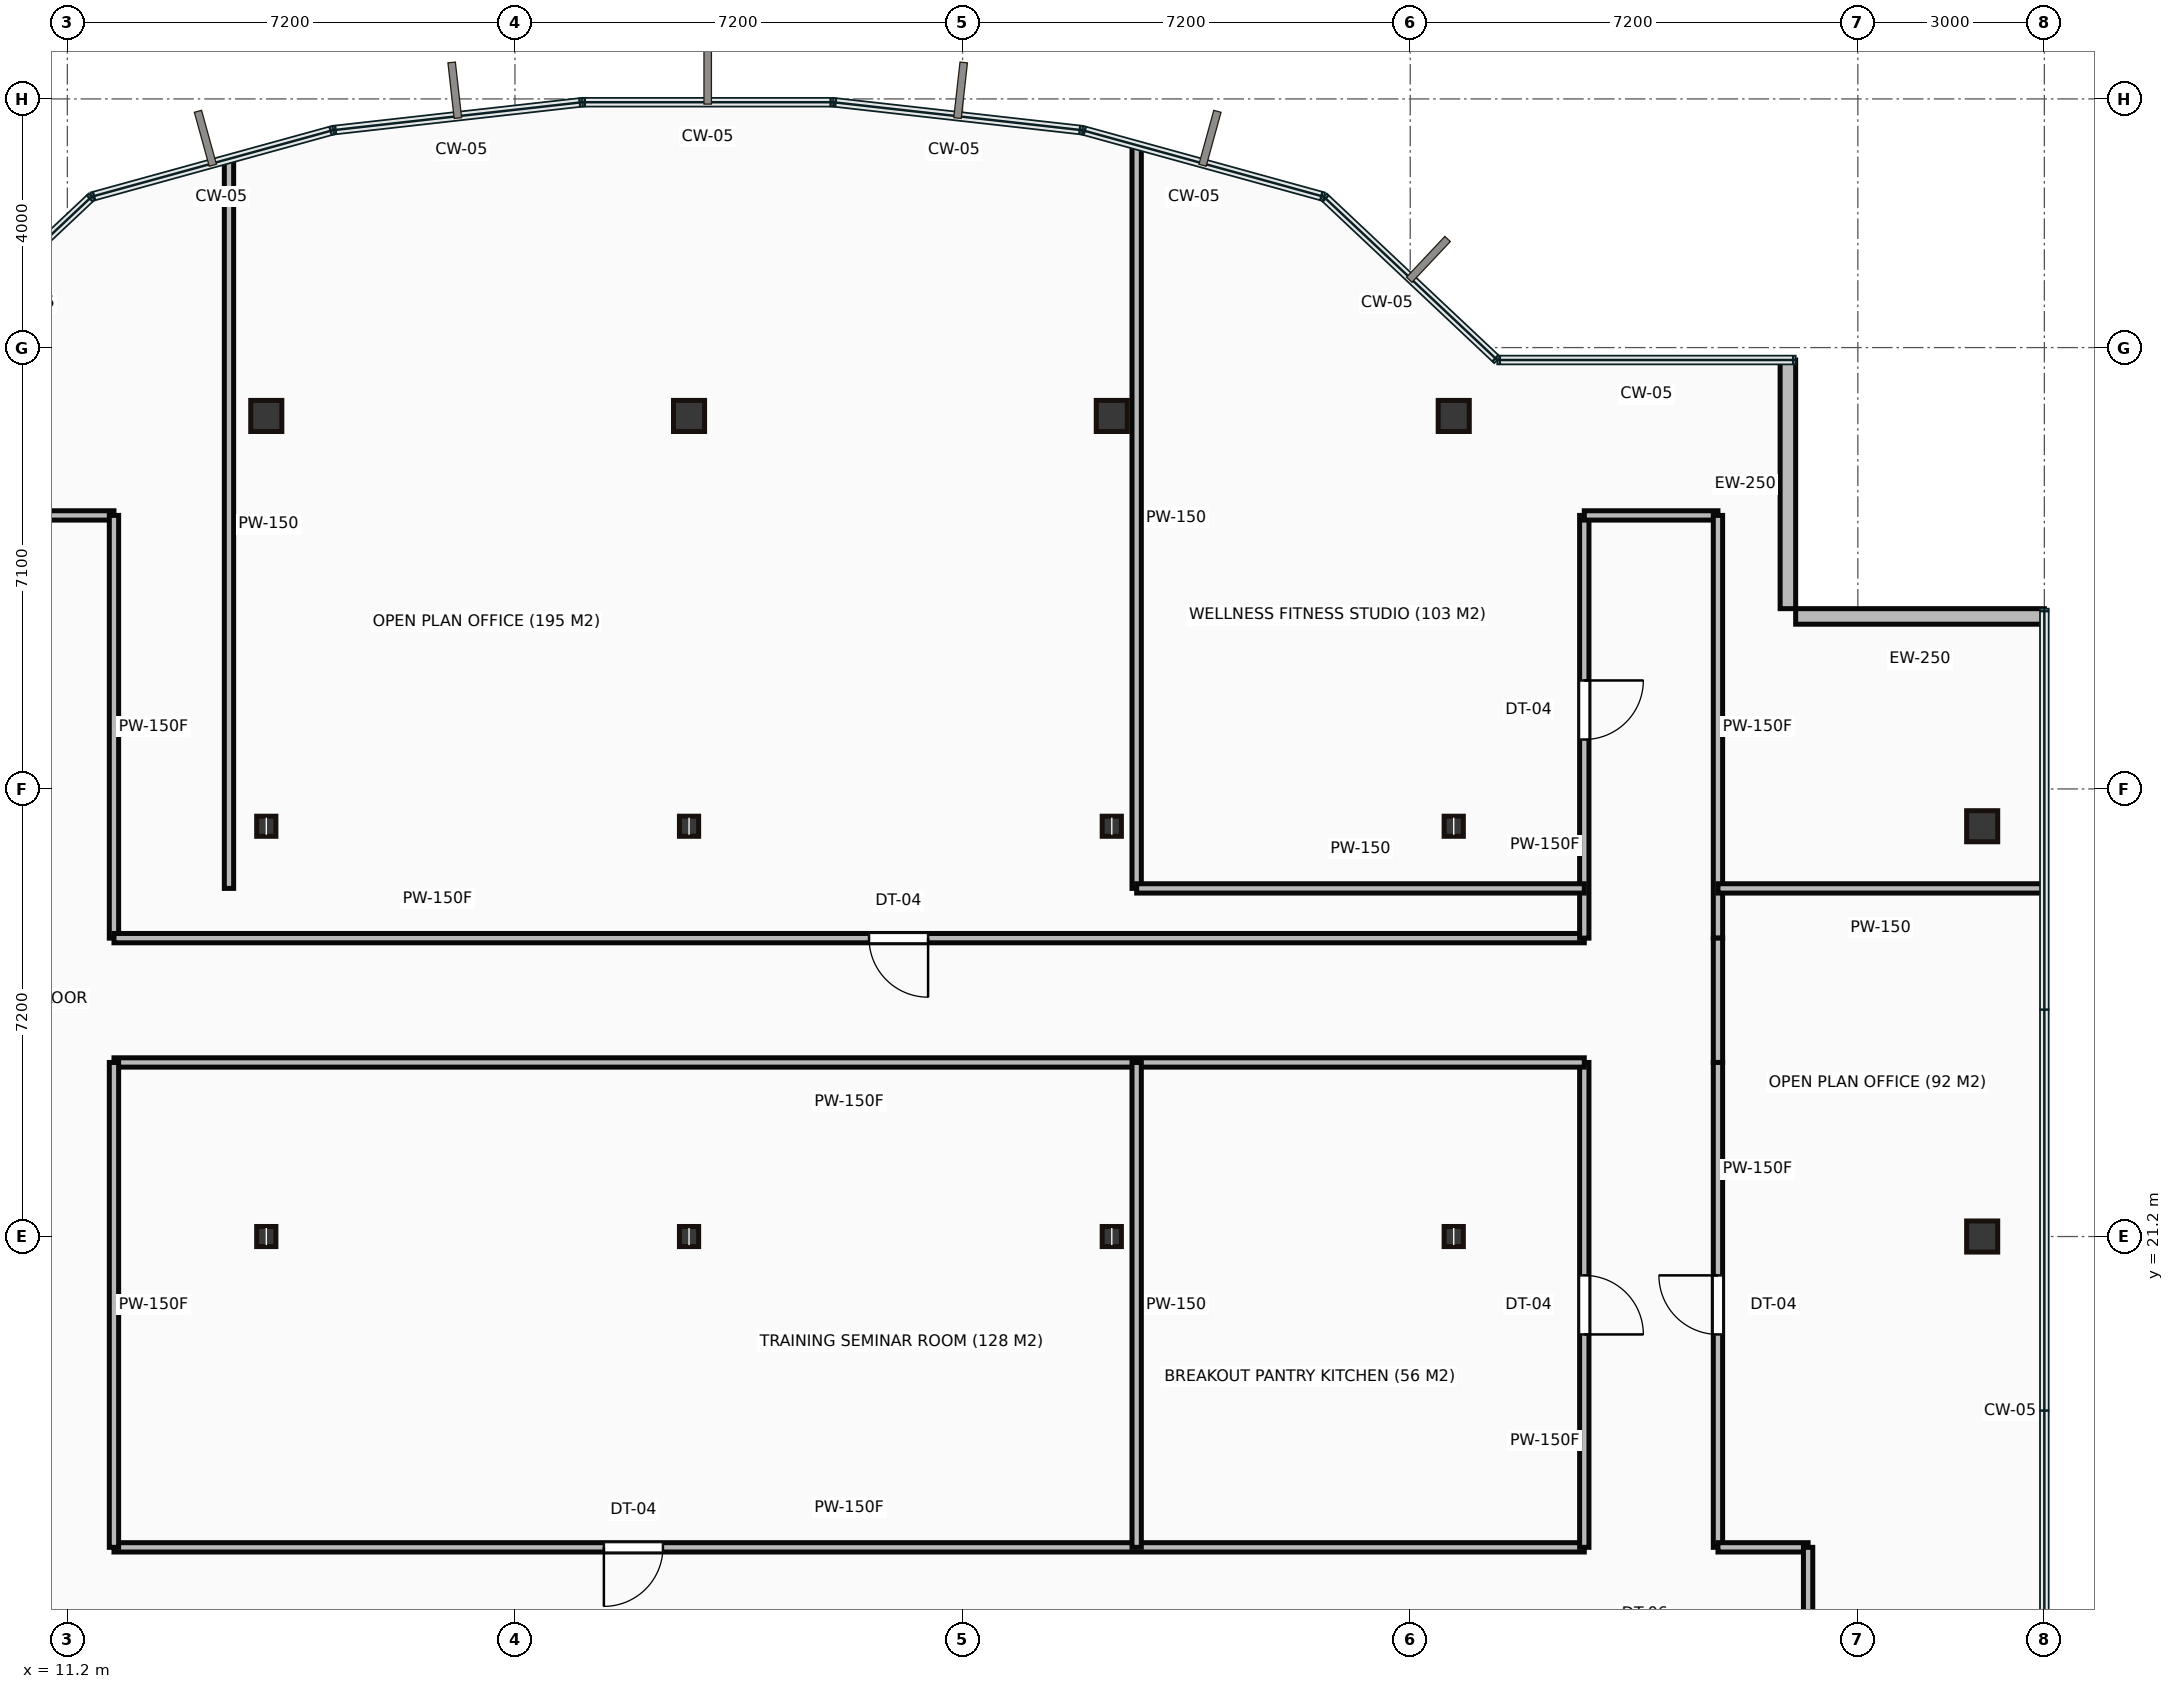
"""IFC4 building model, lengths in metres.
Left out: names, types, materials, properties, quantities, classifications, styles, units other than length and angle.
Written with IfcOpenShell. Run it as: python <this file> out.ifc"""

import sys

from ifc_helpers import new_model, si_unit, direction, frame, frame_2d, origin, origin_2d, place, context, subcontext, project, spatial, rectangle, hollow_rectangle, i_section, extrude, source, transform, mapped, element, fill, save


model = new_model("IFC4")
c1 = context("Model", 3, precision=1e-05, world=origin(), true_north=direction((0.0, 1.0)))
c2 = subcontext(c1, "Body", "Model", "MODEL_VIEW")
j1 = project(units=[si_unit("LENGTHUNIT", "METRE"), si_unit("PLANEANGLEUNIT", "RADIAN")], contexts=[c1])
p1 = place(None, origin())
s1 = spatial("IfcSite", under=j1, at=p1, CompositionType="ELEMENT")
p2 = place(p1, origin())
s2 = spatial("IfcBuilding", under=s1, at=p2, CompositionType="ELEMENT")
p3 = place(p2, frame((0.0, 0.0, 244.2)))
s3 = spatial("IfcBuildingStorey", under=s2, at=p3, CompositionType="ELEMENT", Elevation=244.2)
m1 = source(origin(), c2, "Body", "SweptSolid", [
    extrude(i_section(OverallWidth=0.309, OverallDepth=0.323, WebThickness=0.014, FlangeThickness=0.023, at=origin_2d()), origin(), (0.0, 0.0, 1.0), 3.65),
])
for number, where, z_axis, x_axis in (
    (1, (14.4, 21.2, 0.0), (0.0, 0.0, 1.0), (1.0, 0.0, 0.0)),
    (2, (14.4, 27.8, 0.0), (0.0, 0.0, 1.0), (1.0, 0.0, 0.0)),
):
    element("IfcColumn", number, at=place(p3, frame(where, z_axis=z_axis, x_axis=x_axis)), inside=s3, PredefinedType="COLUMN", context=c2, shape_type="MappedRepresentation", body=[
        mapped(m1, transform((0.0, 0.0, 0.0))),
    ])
m2 = source(origin(), c2, "Body", "SweptSolid", [
    extrude(hollow_rectangle(XDim=0.5, YDim=0.5, WallThickness=0.022, at=origin_2d()), origin(), (0.0, 0.0, 1.0), 3.65),
])
p4 = place(p3, frame((14.4, 34.4, 0.0), z_axis=(0.0, 0.0, 1.0), x_axis=(1.0, 0.0, 0.0)))
e3 = element("IfcColumn", 3, at=p4, inside=s3, PredefinedType="COLUMN", context=c2, shape_type="MappedRepresentation", body=[
    mapped(m2, transform((0.0, 0.0, 0.0))),
])
for number, where, z_axis, x_axis in (
    (4, (21.2, 21.2, 0.0), (0.0, 0.0, 1.0), (1.0, 0.0, 0.0)),
    (5, (21.2, 27.8, 0.0), (0.0, 0.0, 1.0), (1.0, 0.0, 0.0)),
):
    element("IfcColumn", number, at=place(p3, frame(where, z_axis=z_axis, x_axis=x_axis)), inside=s3, PredefinedType="COLUMN", context=c2, shape_type="MappedRepresentation", body=[
        mapped(m1, transform((0.0, 0.0, 0.0))),
    ])
p5 = place(p3, frame((21.2, 34.4, 0.0), z_axis=(0.0, 0.0, 1.0), x_axis=(1.0, 0.0, 0.0)))
e6 = element("IfcColumn", 6, at=p5, inside=s3, PredefinedType="COLUMN", context=c2, shape_type="MappedRepresentation", body=[
    mapped(m2, transform((0.0, 0.0, 0.0))),
])
for number, where, z_axis, x_axis in (
    (7, (28.0, 21.2, 0.0), (0.0, 0.0, 1.0), (1.0, 0.0, 0.0)),
    (8, (28.0, 27.8, 0.0), (0.0, 0.0, 1.0), (1.0, 0.0, 0.0)),
):
    element("IfcColumn", number, at=place(p3, frame(where, z_axis=z_axis, x_axis=x_axis)), inside=s3, PredefinedType="COLUMN", context=c2, shape_type="MappedRepresentation", body=[
        mapped(m1, transform((0.0, 0.0, 0.0))),
    ])
p6 = place(p3, frame((28.0, 34.4, 0.0), z_axis=(0.0, 0.0, 1.0), x_axis=(1.0, 0.0, 0.0)))
e9 = element("IfcColumn", 9, at=p6, inside=s3, PredefinedType="COLUMN", context=c2, shape_type="MappedRepresentation", body=[
    mapped(m2, transform((0.0, 0.0, 0.0))),
])
for number, where, z_axis, x_axis in (
    (10, (33.5, 21.2, 0.0), (0.0, 0.0, 1.0), (1.0, 0.0, 0.0)),
    (11, (33.5, 27.8, 0.0), (0.0, 0.0, 1.0), (1.0, 0.0, 0.0)),
):
    element("IfcColumn", number, at=place(p3, frame(where, z_axis=z_axis, x_axis=x_axis)), inside=s3, PredefinedType="COLUMN", context=c2, shape_type="MappedRepresentation", body=[
        mapped(m1, transform((0.0, 0.0, 0.0))),
    ])
for number, where, z_axis, x_axis in (
    (12, (33.5, 34.4, 0.0), (0.0, 0.0, 1.0), (1.0, 0.0, 0.0)),
    (13, (42.0, 21.2, 0.0), (0.0, 0.0, 1.0), (1.0, 0.0, 0.0)),
    (14, (42.0, 27.8, 0.0), (0.0, 0.0, 1.0), (1.0, 0.0, 0.0)),
):
    element("IfcColumn", number, at=place(p3, frame(where, z_axis=z_axis, x_axis=x_axis)), inside=s3, PredefinedType="COLUMN", context=c2, shape_type="MappedRepresentation", body=[
        mapped(m2, transform((0.0, 0.0, 0.0))),
    ])
m3 = source(origin(), c2, "Body", "SweptSolid", [
    extrude(rectangle(XDim=4.0, YDim=0.25, at=frame_2d((2.0, 0.0))), origin(), (0.0, 0.0, 1.0), 3.4),
])
for number, where, z_axis, x_axis in (
    (15, (43.0, 31.175, 0.0), (0.0, 0.0, 1.0), (-1.0, 0.0, 0.0)),
    (16, (38.875, 31.3, 0.0), (0.0, 0.0, 1.0), (0.0, 1.0, 0.0)),
):
    element("IfcWall", number, at=place(p3, frame(where, z_axis=z_axis, x_axis=x_axis)), inside=s3, PredefinedType="STANDARD", context=c2, shape_type="MappedRepresentation", body=[
        mapped(m3, transform((0.0, 0.0, 0.0))),
    ])
m4 = source(origin(), c2, "Body", "SweptSolid", [
    extrude(rectangle(XDim=2.15, YDim=0.15, at=frame_2d((1.075, 0.0))), origin(), (0.0, 0.0, 1.0), 3.4),
])
p7 = place(p3, frame((9.8, 32.8, 0.0), z_axis=(0.0, 0.0, 1.0), x_axis=(1.0, 0.0, 0.0)))
e17 = element("IfcWall", 17, at=p7, inside=s3, PredefinedType="PARTITIONING", context=c2, shape_type="MappedRepresentation", body=[
    mapped(m4, transform((0.0, 0.0, 0.0))),
])
m5 = source(origin(), c2, "Body", "SweptSolid", [
    extrude(rectangle(XDim=6.8, YDim=0.15, at=frame_2d((3.4, 0.0))), origin(), (0.0, 0.0, 1.0), 3.4),
])
p8 = place(p3, frame((11.95, 32.8, 0.0), z_axis=(0.0, 0.0, 1.0), x_axis=(0.0, -1.0, 0.0)))
e18 = element("IfcWall", 18, at=p8, inside=s3, PredefinedType="PARTITIONING", context=c2, shape_type="MappedRepresentation", body=[
    mapped(m5, transform((0.0, 0.0, 0.0))),
])
m6 = source(origin(), c2, "Body", "SweptSolid", [
    extrude(rectangle(XDim=23.65, YDim=0.15, at=frame_2d((11.825, 0.0))), origin(), (0.0, 0.0, 1.0), 3.4),
])
p9 = place(p3, frame((11.95, 26.0, 0.0), z_axis=(0.0, 0.0, 1.0), x_axis=(1.0, 0.0, 0.0)))
e19 = element("IfcWall", 19, at=p9, inside=s3, PredefinedType="PARTITIONING", context=c2, shape_type="MappedRepresentation", body=[
    mapped(m6, transform((0.0, 0.0, 0.0))),
])
p10 = place(p9, frame((12.145, 0.0, 0.0)))
e20 = element("IfcOpeningElement", 20, at=p10, cuts=e19, PredefinedType="OPENING", context=c2, shape_type="SweptSolid", body=[
    extrude(rectangle(XDim=0.95, YDim=2.15, at=frame_2d((0.475, 1.075))), frame((0.0, 0.085, 0.0), z_axis=(0.0, -1.0, 0.0), x_axis=(1.0, 0.0, 0.0)), (0.0, 0.0, 1.0), 0.17),
])
p11 = place(p3, frame((35.6, 26.0, 0.0), z_axis=(0.0, 0.0, 1.0), x_axis=(0.0, 1.0, 0.0)))
e21 = element("IfcWall", 21, at=p11, inside=s3, PredefinedType="PARTITIONING", context=c2, shape_type="MappedRepresentation", body=[
    mapped(m5, transform((0.0, 0.0, 0.0))),
])
p12 = place(p11, frame((3.195, 0.0, 0.0)))
e22 = element("IfcOpeningElement", 22, at=p12, cuts=e21, PredefinedType="OPENING", context=c2, shape_type="SweptSolid", body=[
    extrude(rectangle(XDim=0.95, YDim=2.15, at=frame_2d((0.475, 1.075))), frame((0.0, 0.085, 0.0), z_axis=(0.0, -1.0, 0.0), x_axis=(1.0, 0.0, 0.0)), (0.0, 0.0, 1.0), 0.17),
])
p13 = place(p3, frame((35.6, 32.8, 0.0), z_axis=(0.0, 0.0, 1.0), x_axis=(1.0, 0.0, 0.0)))
e23 = element("IfcWall", 23, at=p13, inside=s3, PredefinedType="PARTITIONING", context=c2, shape_type="MappedRepresentation", body=[
    mapped(m4, transform((0.0, 0.0, 0.0))),
])
p14 = place(p3, frame((37.75, 32.8, 0.0), z_axis=(0.0, 0.0, 1.0), x_axis=(0.0, -1.0, 0.0)))
e24 = element("IfcWall", 24, at=p14, inside=s3, PredefinedType="PARTITIONING", context=c2, shape_type="MappedRepresentation", body=[
    mapped(m5, transform((0.0, 0.0, 0.0))),
])
m7 = source(origin(), c2, "Body", "SweptSolid", [
    extrude(rectangle(XDim=2.0, YDim=0.15, at=frame_2d((1.0, 0.0))), origin(), (0.0, 0.0, 1.0), 3.4),
])
p15 = place(p3, frame((37.75, 26.0, 0.0), z_axis=(0.0, 0.0, 1.0), x_axis=(0.0, -1.0, 0.0)))
e25 = element("IfcWall", 25, at=p15, inside=s3, PredefinedType="PARTITIONING", context=c2, shape_type="MappedRepresentation", body=[
    mapped(m7, transform((0.0, 0.0, 0.0))),
])
m8 = source(origin(), c2, "Body", "SweptSolid", [
    extrude(rectangle(XDim=7.8, YDim=0.15, at=frame_2d((3.9, 0.0))), origin(), (0.0, 0.0, 1.0), 3.4),
])
p16 = place(p3, frame((37.75, 24.0, 0.0), z_axis=(0.0, 0.0, 1.0), x_axis=(0.0, -1.0, 0.0)))
e26 = element("IfcWall", 26, at=p16, inside=s3, PredefinedType="PARTITIONING", context=c2, shape_type="MappedRepresentation", body=[
    mapped(m8, transform((0.0, 0.0, 0.0))),
])
p17 = place(p16, frame((3.425, 0.0, 0.0)))
e27 = element("IfcOpeningElement", 27, at=p17, cuts=e26, PredefinedType="OPENING", context=c2, shape_type="SweptSolid", body=[
    extrude(rectangle(XDim=0.95, YDim=2.15, at=frame_2d((0.475, 1.075))), frame((0.0, 0.085, 0.0), z_axis=(0.0, -1.0, 0.0), x_axis=(1.0, 0.0, 0.0)), (0.0, 0.0, 1.0), 0.17),
])
m9 = source(origin(), c2, "Body", "SweptSolid", [
    extrude(rectangle(XDim=1.45, YDim=0.15, at=frame_2d((0.725, 0.0))), origin(), (0.0, 0.0, 1.0), 3.4),
])
p18 = place(p3, frame((37.75, 16.2, 0.0), z_axis=(0.0, 0.0, 1.0), x_axis=(1.0, 0.0, 0.0)))
e28 = element("IfcWall", 28, at=p18, inside=s3, PredefinedType="PARTITIONING", context=c2, shape_type="MappedRepresentation", body=[
    mapped(m9, transform((0.0, 0.0, 0.0))),
])
m10 = source(origin(), c2, "Body", "SweptSolid", [
    extrude(rectangle(XDim=2.2, YDim=0.15, at=frame_2d((1.1, 0.0))), origin(), (0.0, 0.0, 1.0), 3.4),
])
p19 = place(p3, frame((39.2, 16.2, 0.0), z_axis=(0.0, 0.0, 1.0), x_axis=(0.0, -1.0, 0.0)))
e29 = element("IfcWall", 29, at=p19, inside=s3, PredefinedType="PARTITIONING", context=c2, shape_type="MappedRepresentation", body=[
    mapped(m10, transform((0.0, 0.0, 0.0))),
])
p20 = place(p3, frame((11.95, 16.2, 0.0), z_axis=(0.0, 0.0, 1.0), x_axis=(1.0, 0.0, 0.0)))
e30 = element("IfcWall", 30, at=p20, inside=s3, PredefinedType="PARTITIONING", context=c2, shape_type="MappedRepresentation", body=[
    mapped(m6, transform((0.0, 0.0, 0.0))),
])
p21 = place(p20, frame((7.88, 0.0, 0.0)))
e31 = element("IfcOpeningElement", 31, at=p21, cuts=e30, PredefinedType="OPENING", context=c2, shape_type="SweptSolid", body=[
    extrude(rectangle(XDim=0.95, YDim=2.15, at=frame_2d((0.475, 1.075))), frame((0.0, 0.085, 0.0), z_axis=(0.0, -1.0, 0.0), x_axis=(1.0, 0.0, 0.0)), (0.0, 0.0, 1.0), 0.17),
])
p22 = place(p3, frame((35.6, 16.2, 0.0), z_axis=(0.0, 0.0, 1.0), x_axis=(0.0, 1.0, 0.0)))
e32 = element("IfcWall", 32, at=p22, inside=s3, PredefinedType="PARTITIONING", context=c2, shape_type="MappedRepresentation", body=[
    mapped(m8, transform((0.0, 0.0, 0.0))),
])
p23 = place(p22, frame((3.425, 0.0, 0.0)))
e33 = element("IfcOpeningElement", 33, at=p23, cuts=e32, PredefinedType="OPENING", context=c2, shape_type="SweptSolid", body=[
    extrude(rectangle(XDim=0.95, YDim=2.15, at=frame_2d((0.475, 1.075))), frame((0.0, 0.085, 0.0), z_axis=(0.0, -1.0, 0.0), x_axis=(1.0, 0.0, 0.0)), (0.0, 0.0, 1.0), 0.17),
])
p24 = place(p3, frame((35.6, 24.0, 0.0), z_axis=(0.0, 0.0, 1.0), x_axis=(-1.0, 0.0, 0.0)))
e34 = element("IfcWall", 34, at=p24, inside=s3, PredefinedType="PARTITIONING", context=c2, shape_type="MappedRepresentation", body=[
    mapped(m6, transform((0.0, 0.0, 0.0))),
])
p25 = place(p3, frame((11.95, 24.0, 0.0), z_axis=(0.0, 0.0, 1.0), x_axis=(0.0, -1.0, 0.0)))
e35 = element("IfcWall", 35, at=p25, inside=s3, PredefinedType="PARTITIONING", context=c2, shape_type="MappedRepresentation", body=[
    mapped(m8, transform((0.0, 0.0, 0.0))),
])
m11 = source(origin(), c2, "Body", "SweptSolid", [
    extrude(rectangle(XDim=11.715, YDim=0.15, at=frame_2d((5.857, 0.0))), origin(), (0.0, 0.0, 1.0), 3.4),
])
p26 = place(p3, frame((13.8, 38.515, 0.0), z_axis=(0.0, 0.0, 1.0), x_axis=(0.0, -1.0, 0.0)))
e36 = element("IfcWall", 36, at=p26, inside=s3, PredefinedType="PARTITIONING", context=c2, shape_type="MappedRepresentation", body=[
    mapped(m11, transform((0.0, 0.0, 0.0))),
])
p27 = place(p3, frame((28.4, 24.0, 0.0), z_axis=(0.0, 0.0, 1.0), x_axis=(0.0, -1.0, 0.0)))
e37 = element("IfcWall", 37, at=p27, inside=s3, PredefinedType="PARTITIONING", context=c2, shape_type="MappedRepresentation", body=[
    mapped(m8, transform((0.0, 0.0, 0.0))),
])
m12 = source(origin(), c2, "Body", "SweptSolid", [
    extrude(rectangle(XDim=11.935, YDim=0.15, at=frame_2d((5.968, 0.0))), origin(), (0.0, 0.0, 1.0), 3.4),
])
p28 = place(p3, frame((28.4, 38.735, 0.0), z_axis=(0.0, 0.0, 1.0), x_axis=(0.0, -1.0, 0.0)))
e38 = element("IfcWall", 38, at=p28, inside=s3, PredefinedType="PARTITIONING", context=c2, shape_type="MappedRepresentation", body=[
    mapped(m12, transform((0.0, 0.0, 0.0))),
])
m13 = source(origin(), c2, "Body", "SweptSolid", [
    extrude(rectangle(XDim=7.2, YDim=0.15, at=frame_2d((3.6, 0.0))), origin(), (0.0, 0.0, 1.0), 3.4),
])
p29 = place(p3, frame((28.4, 26.8, 0.0), z_axis=(0.0, 0.0, 1.0), x_axis=(1.0, 0.0, 0.0)))
e39 = element("IfcWall", 39, at=p29, inside=s3, PredefinedType="PARTITIONING", context=c2, shape_type="MappedRepresentation", body=[
    mapped(m13, transform((0.0, 0.0, 0.0))),
])
m14 = source(origin(), c2, "Body", "SweptSolid", [
    extrude(rectangle(XDim=5.23, YDim=0.15, at=frame_2d((2.615, 0.0))), origin(), (0.0, 0.0, 1.0), 3.4),
])
p30 = place(p3, frame((42.98, 26.8, 0.0), z_axis=(0.0, 0.0, 1.0), x_axis=(-1.0, 0.0, 0.0)))
e40 = element("IfcWall", 40, at=p30, inside=s3, PredefinedType="PARTITIONING", context=c2, shape_type="MappedRepresentation", body=[
    mapped(m14, transform((0.0, 0.0, 0.0))),
])
m15 = source(origin(), c2, "Body", "SweptSolid", [
    extrude(rectangle(XDim=0.95, YDim=2.15, at=frame_2d((0.475, 1.075))), frame((0.0, 0.025, 0.0), z_axis=(0.0, -1.0, 0.0), x_axis=(1.0, 0.0, 0.0)), (0.0, 0.0, 1.0), 0.05),
])
p31 = place(p21, origin())
e41 = element("IfcDoor", 41, at=p31, inside=s3, OperationType="SINGLE_SWING_LEFT", PredefinedType="DOOR", context=c2, shape_type="MappedRepresentation", body=[
    mapped(m15, transform((0.0, 0.0, 0.0))),
])
fill(e31, e41)
p32 = place(p10, origin())
e42 = element("IfcDoor", 42, at=p32, inside=s3, OperationType="SINGLE_SWING_RIGHT", PredefinedType="DOOR", context=c2, shape_type="MappedRepresentation", body=[
    mapped(m15, transform((0.0, 0.0, 0.0))),
])
fill(e20, e42)
p33 = place(p23, origin())
e43 = element("IfcDoor", 43, at=p33, inside=s3, OperationType="SINGLE_SWING_LEFT", PredefinedType="DOOR", context=c2, shape_type="MappedRepresentation", body=[
    mapped(m15, transform((0.0, 0.0, 0.0))),
])
fill(e33, e43)
p34 = place(p12, origin())
e44 = element("IfcDoor", 44, at=p34, inside=s3, OperationType="SINGLE_SWING_RIGHT", PredefinedType="DOOR", context=c2, shape_type="MappedRepresentation", body=[
    mapped(m15, transform((0.0, 0.0, 0.0))),
])
fill(e22, e44)
p35 = place(p17, origin())
e45 = element("IfcDoor", 45, at=p35, inside=s3, OperationType="SINGLE_SWING_LEFT", PredefinedType="DOOR", context=c2, shape_type="MappedRepresentation", body=[
    mapped(m15, transform((0.0, 0.0, 0.0))),
])
fill(e27, e45)
save(model, sys.argv[1])
